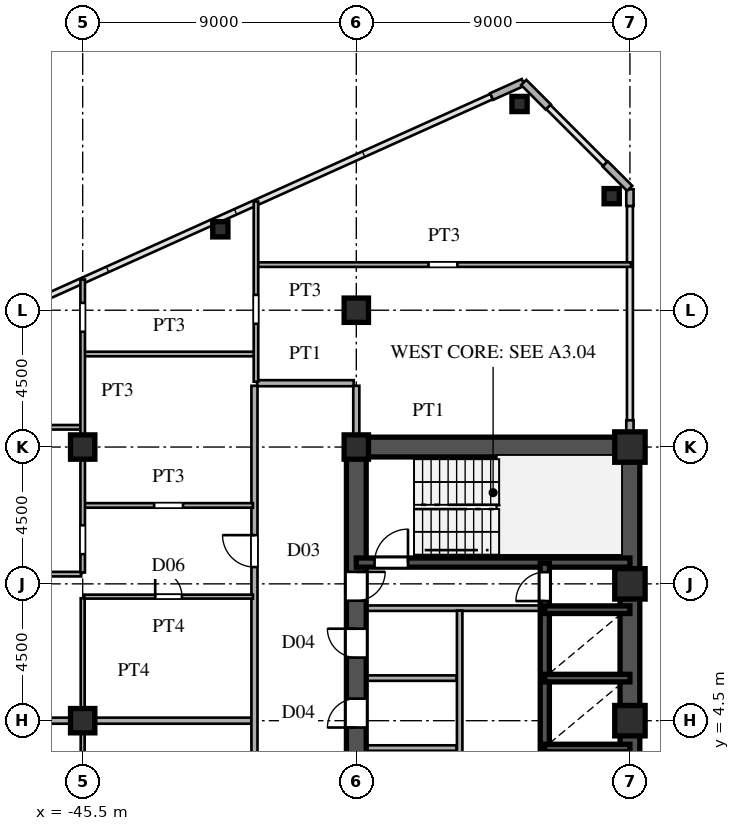
"""IFC4 building model, lengths in metres.
Left out: names, types, materials, properties, quantities, classifications, styles, units other than length and angle.
Written with IfcOpenShell. Run it as: python <this file> out.ifc"""

import sys

from ifc_helpers import new_model, si_unit, direction, frame, frame_2d, origin, origin_2d, place, context, subcontext, project, spatial, rectangle, hollow_rectangle, i_section, extrude, source, transform, mapped, element, fill, save


model = new_model("IFC4")
c1 = context("Model", 3, precision=1e-05, world=origin(), true_north=direction((0.0, 1.0)))
c2 = subcontext(c1, "Body", "Model", "MODEL_VIEW")
j1 = project(units=[si_unit("LENGTHUNIT", "METRE"), si_unit("PLANEANGLEUNIT", "RADIAN")], contexts=[c1])
p1 = place(None, origin())
s1 = spatial("IfcSite", under=j1, at=p1, CompositionType="ELEMENT")
p2 = place(p1, origin())
s2 = spatial("IfcBuilding", under=s1, at=p2, CompositionType="ELEMENT")
p3 = place(p2, frame((0.0, 0.0, 80.1)))
s3 = spatial("IfcBuildingStorey", under=s2, at=p3, CompositionType="ELEMENT", Elevation=80.1)
m1 = source(origin(), c2, "Body", "SweptSolid", [
    extrude(hollow_rectangle(XDim=1.0, YDim=1.0, WallThickness=0.042, at=origin_2d()), origin(), (0.0, 0.0, 1.0), 3.6),
])
for number, where, z_axis, x_axis in (
    (1, (-27.5, 4.5, 0.0), (0.0, 0.0, 1.0), (1.0, 0.0, 0.0)),
    (2, (-27.5, 9.0, 0.0), (0.0, 0.0, 1.0), (1.0, 0.0, 0.0)),
    (3, (-27.5, 13.5, 0.0), (0.0, 0.0, 1.0), (1.0, 0.0, 0.0)),
):
    element("IfcColumn", number, at=place(p3, frame(where, z_axis=z_axis, x_axis=x_axis)), inside=s3, PredefinedType="COLUMN", context=c2, shape_type="MappedRepresentation", body=[
        mapped(m1, transform((0.0, 0.0, 0.0), scale=1.0)),
    ])
m2 = source(origin(), c2, "Body", "SweptSolid", [
    extrude(i_section(OverallWidth=0.8, OverallDepth=0.8, WebThickness=0.032, FlangeThickness=0.05, at=origin_2d()), origin(), (0.0, 0.0, 1.0), 3.6),
])
for number, where, z_axis, x_axis in (
    (4, (-36.5, 13.5, 0.0), (0.0, 0.0, 1.0), (1.0, 0.0, 0.0)),
    (5, (-36.5, 18.0, 0.0), (0.0, 0.0, 1.0), (1.0, 0.0, 0.0)),
    (6, (-45.5, 4.5, 0.0), (0.0, 0.0, 1.0), (1.0, 0.0, 0.0)),
    (7, (-45.5, 13.5, 0.0), (0.0, 0.0, 1.0), (1.0, 0.0, 0.0)),
):
    element("IfcColumn", number, at=place(p3, frame(where, z_axis=z_axis, x_axis=x_axis)), inside=s3, PredefinedType="COLUMN", context=c2, shape_type="MappedRepresentation", body=[
        mapped(m2, transform((0.0, 0.0, 0.0), scale=1.0)),
    ])
m3 = source(origin(), c2, "Body", "SweptSolid", [
    extrude(hollow_rectangle(XDim=0.5, YDim=0.5, WallThickness=0.02, at=origin_2d()), origin(), (0.0, 0.0, 1.0), 3.6),
])
for number, where, z_axis, x_axis in (
    (8, (-28.1, 21.751, 0.0), (0.0, 0.0, 1.0), (1.0, 0.0, 0.0)),
    (9, (-31.131, 24.783, 0.0), (0.0, 0.0, 1.0), (1.0, 0.0, 0.0)),
    (10, (-40.973, 20.661, 0.0), (0.0, 0.0, 1.0), (1.0, 0.0, 0.0)),
):
    element("IfcColumn", number, at=place(p3, frame(where, z_axis=z_axis, x_axis=x_axis)), inside=s3, PredefinedType="COLUMN", context=c2, shape_type="MappedRepresentation", body=[
        mapped(m3, transform((0.0, 0.0, 0.0), scale=1.0)),
    ])
p4 = place(p3, frame((-27.5, 13.83, 0.0), z_axis=(0.0, 0.0, 1.0), x_axis=(0.0, 1.0, 0.0)))
e11 = element("IfcWall", 11, at=p4, inside=s3, PredefinedType="SOLIDWALL", context=c2, shape_type="SweptSolid", body=[
    extrude(rectangle(XDim=0.55, YDim=0.24, at=frame_2d((0.275, 0.0))), origin(), (0.0, 0.0, 1.0), 2.88),
])
p5 = place(p3, frame((-27.5, 21.43, 0.0), z_axis=(0.0, 0.0, 1.0), x_axis=(0.0, 1.0, 0.0)))
e12 = element("IfcWall", 12, at=p5, inside=s3, PredefinedType="SOLIDWALL", context=c2, shape_type="SweptSolid", body=[
    extrude(rectangle(XDim=0.55, YDim=0.24, at=frame_2d((0.275, 0.0))), origin(), (0.0, 0.0, 1.0), 3.38),
])
for number, where, z_axis, x_axis in (
    (13, (-27.507, 22.007, 0.0), (0.0, 0.0, 1.0), (-0.707, 0.707, 0.0)),
    (14, (-30.187, 24.687, 0.0), (0.0, 0.0, 1.0), (-0.707, 0.707, 0.0)),
):
    element("IfcWall", number, at=place(p3, frame(where, z_axis=z_axis, x_axis=x_axis)), inside=s3, PredefinedType="SOLIDWALL", context=c2, shape_type="SweptSolid", body=[
        extrude(rectangle(XDim=1.14, YDim=0.24, at=frame_2d((0.57, 0.0))), origin(), (0.0, 0.0, 1.0), 3.38),
    ])
p6 = place(p3, frame((-31.009, 25.496, 0.0), z_axis=(0.0, 0.0, 1.0), x_axis=(-0.911929519623, -0.410346866979, 0.0)))
e15 = element("IfcWall", 15, at=p6, inside=s3, PredefinedType="SOLIDWALL", context=c2, shape_type="SweptSolid", body=[
    extrude(rectangle(XDim=1.14, YDim=0.24, at=frame_2d((0.57, 0.0))), origin(), (0.0, 0.0, 1.0), 3.38),
])
p7 = place(p3, frame((-27.5, 1.3, 0.0), z_axis=(0.0, 0.0, 1.0), x_axis=(0.0, 1.0, 0.0)))
e16 = element("IfcWall", 16, at=p7, inside=s3, PredefinedType="SHEAR", context=c2, shape_type="SweptSolid", body=[
    extrude(rectangle(XDim=12.2, YDim=0.65, at=frame_2d((6.1, 0.0))), origin(), (0.0, 0.0, 1.0), 3.38),
])
p8 = place(p3, frame((-36.5, 13.5, 0.0), z_axis=(0.0, 0.0, 1.0), x_axis=(1.0, 0.0, 0.0)))
e17 = element("IfcWall", 17, at=p8, inside=s3, PredefinedType="SHEAR", context=c2, shape_type="SweptSolid", body=[
    extrude(rectangle(XDim=9.0, YDim=0.65, at=frame_2d((4.5, 0.0))), origin(), (0.0, 0.0, 1.0), 3.38),
])
p9 = place(p3, frame((-36.5, 8.2, 0.0), z_axis=(0.0, 0.0, 1.0), x_axis=(0.0, 1.0, 0.0)))
e18 = element("IfcWall", 18, at=p9, inside=s3, PredefinedType="SHEAR", context=c2, shape_type="SweptSolid", body=[
    extrude(rectangle(XDim=5.45, YDim=0.65, at=frame_2d((2.725, 0.0))), origin(), (0.0, 0.0, 1.0), 3.38),
])
p10 = place(p9, frame((0.245, 0.0, 0.0)))
e19 = element("IfcOpeningElement", 19, at=p10, cuts=e18, PredefinedType="OPENING", context=c2, shape_type="SweptSolid", body=[
    extrude(rectangle(XDim=0.95, YDim=2.15, at=frame_2d((0.475, 1.075))), frame((0.0, 0.335, 0.0), z_axis=(0.0, -1.0, 0.0), x_axis=(1.0, 0.0, 0.0)), (0.0, 0.0, 1.0), 0.67),
])
p11 = place(p3, frame((-36.5, 1.3, 0.0), z_axis=(0.0, 0.0, 1.0), x_axis=(0.0, 1.0, 0.0)))
e20 = element("IfcWall", 20, at=p11, inside=s3, PredefinedType="SHEAR", context=c2, shape_type="SweptSolid", body=[
    extrude(rectangle(XDim=2.3, YDim=0.65, at=frame_2d((1.15, 0.0))), origin(), (0.0, 0.0, 1.0), 3.38),
])
p12 = place(p11, frame((0.675, 0.0, 0.0)))
e21 = element("IfcOpeningElement", 21, at=p12, cuts=e20, PredefinedType="OPENING", context=c2, shape_type="SweptSolid", body=[
    extrude(rectangle(XDim=0.95, YDim=2.15, at=frame_2d((0.475, 1.075))), frame((0.0, 0.335, 0.0), z_axis=(0.0, -1.0, 0.0), x_axis=(1.0, 0.0, 0.0)), (0.0, 0.0, 1.0), 0.67),
])
p13 = place(p3, frame((-36.5, 3.6, 0.0), z_axis=(0.0, 0.0, 1.0), x_axis=(0.0, 1.0, 0.0)))
e22 = element("IfcWall", 22, at=p13, inside=s3, PredefinedType="SHEAR", context=c2, shape_type="SweptSolid", body=[
    extrude(rectangle(XDim=2.3, YDim=0.65, at=frame_2d((1.15, 0.0))), origin(), (0.0, 0.0, 1.0), 3.38),
])
p14 = place(p13, frame((0.675, 0.0, 0.0)))
e23 = element("IfcOpeningElement", 23, at=p14, cuts=e22, PredefinedType="OPENING", context=c2, shape_type="SweptSolid", body=[
    extrude(rectangle(XDim=0.95, YDim=2.15, at=frame_2d((0.475, 1.075))), frame((0.0, 0.335, 0.0), z_axis=(0.0, -1.0, 0.0), x_axis=(1.0, 0.0, 0.0)), (0.0, 0.0, 1.0), 0.67),
])
p15 = place(p3, frame((-36.5, 5.9, 0.0), z_axis=(0.0, 0.0, 1.0), x_axis=(0.0, 1.0, 0.0)))
e24 = element("IfcWall", 24, at=p15, inside=s3, PredefinedType="SHEAR", context=c2, shape_type="SweptSolid", body=[
    extrude(rectangle(XDim=2.3, YDim=0.65, at=frame_2d((1.15, 0.0))), origin(), (0.0, 0.0, 1.0), 3.38),
])
p16 = place(p15, frame((0.675, 0.0, 0.0)))
e25 = element("IfcOpeningElement", 25, at=p16, cuts=e24, PredefinedType="OPENING", context=c2, shape_type="SweptSolid", body=[
    extrude(rectangle(XDim=0.95, YDim=2.15, at=frame_2d((0.475, 1.075))), frame((0.0, 0.335, 0.0), z_axis=(0.0, -1.0, 0.0), x_axis=(1.0, 0.0, 0.0)), (0.0, 0.0, 1.0), 0.67),
])
p17 = place(p3, frame((-36.5, 9.7, 0.0), z_axis=(0.0, 0.0, 1.0), x_axis=(1.0, 0.0, 0.0)))
e26 = element("IfcWall", 26, at=p17, inside=s3, PredefinedType="SHEAR", context=c2, shape_type="SweptSolid", body=[
    extrude(rectangle(XDim=9.0, YDim=0.3, at=frame_2d((4.5, 0.0))), origin(), (0.0, 0.0, 1.0), 3.38),
])
p18 = place(p17, frame((0.6, 0.0, 0.0)))
e27 = element("IfcOpeningElement", 27, at=p18, cuts=e26, PredefinedType="OPENING", context=c2, shape_type="SweptSolid", body=[
    extrude(rectangle(XDim=1.1, YDim=2.2, at=frame_2d((0.55, 1.1))), frame((0.0, 0.16, 0.0), z_axis=(0.0, -1.0, 0.0), x_axis=(1.0, 0.0, 0.0)), (0.0, 0.0, 1.0), 0.32),
])
for number, where, z_axis, x_axis in (
    (28, (-30.3, 3.6, 0.0), (0.0, 0.0, 1.0), (1.0, 0.0, 0.0)),
    (29, (-30.3, 5.9, 0.0), (0.0, 0.0, 1.0), (1.0, 0.0, 0.0)),
    (30, (-30.3, 8.15, 0.0), (0.0, 0.0, 1.0), (1.0, 0.0, 0.0)),
):
    element("IfcWall", number, at=place(p3, frame(where, z_axis=z_axis, x_axis=x_axis)), inside=s3, PredefinedType="SHEAR", context=c2, shape_type="SweptSolid", body=[
        extrude(rectangle(XDim=2.8, YDim=0.25, at=frame_2d((1.4, 0.0))), origin(), (0.0, 0.0, 1.0), 3.38),
    ])
p19 = place(p3, frame((-30.3, 1.32, 0.0), z_axis=(0.0, 0.0, 1.0), x_axis=(0.0, 1.0, 0.0)))
e31 = element("IfcWall", 31, at=p19, inside=s3, PredefinedType="SHEAR", context=c2, shape_type="SweptSolid", body=[
    extrude(rectangle(XDim=2.28, YDim=0.3, at=frame_2d((1.14, 0.0))), origin(), (0.0, 0.0, 1.0), 3.38),
])
p20 = place(p3, frame((-30.3, 3.6, 0.0), z_axis=(0.0, 0.0, 1.0), x_axis=(0.0, 1.0, 0.0)))
e32 = element("IfcWall", 32, at=p20, inside=s3, PredefinedType="SHEAR", context=c2, shape_type="SweptSolid", body=[
    extrude(rectangle(XDim=2.3, YDim=0.3, at=frame_2d((1.15, 0.0))), origin(), (0.0, 0.0, 1.0), 3.38),
])
p21 = place(p3, frame((-30.3, 5.9, 0.0), z_axis=(0.0, 0.0, 1.0), x_axis=(0.0, 1.0, 0.0)))
e33 = element("IfcWall", 33, at=p21, inside=s3, PredefinedType="SHEAR", context=c2, shape_type="SweptSolid", body=[
    extrude(rectangle(XDim=2.25, YDim=0.3, at=frame_2d((1.125, 0.0))), origin(), (0.0, 0.0, 1.0), 3.38),
])
p22 = place(p3, frame((-30.3, 8.15, 0.0), z_axis=(0.0, 0.0, 1.0), x_axis=(0.0, 1.0, 0.0)))
e34 = element("IfcWall", 34, at=p22, inside=s3, PredefinedType="SHEAR", context=c2, shape_type="SweptSolid", body=[
    extrude(rectangle(XDim=1.53, YDim=0.3, at=frame_2d((0.765, 0.0))), origin(), (0.0, 0.0, 1.0), 3.38),
])
p23 = place(p22, frame((0.285, 0.0, 0.0)))
e35 = element("IfcOpeningElement", 35, at=p23, cuts=e34, PredefinedType="OPENING", context=c2, shape_type="SweptSolid", body=[
    extrude(rectangle(XDim=0.95, YDim=2.15, at=frame_2d((0.475, 1.075))), frame((0.0, 0.16, 0.0), z_axis=(0.0, -1.0, 0.0), x_axis=(1.0, 0.0, 0.0)), (0.0, 0.0, 1.0), 0.32),
])
p24 = place(p3, frame((-36.15, 8.2, 0.0), z_axis=(0.0, 0.0, 1.0), x_axis=(1.0, 0.0, 0.0)))
e36 = element("IfcWall", 36, at=p24, inside=s3, PredefinedType="PARTITIONING", context=c2, shape_type="SweptSolid", body=[
    extrude(rectangle(XDim=5.7, YDim=0.18, at=frame_2d((2.85, 0.0))), origin(), (0.0, 0.0, 1.0), 3.38),
])
p25 = place(p3, frame((-33.1, 1.38, 0.0), z_axis=(0.0, 0.0, 1.0), x_axis=(0.0, 1.0, 0.0)))
e37 = element("IfcWall", 37, at=p25, inside=s3, PredefinedType="PARTITIONING", context=c2, shape_type="SweptSolid", body=[
    extrude(rectangle(XDim=6.74, YDim=0.18, at=frame_2d((3.37, 0.0))), origin(), (0.0, 0.0, 1.0), 3.38),
])
for number, where, z_axis, x_axis in (
    (38, (-36.15, 3.6, 0.0), (0.0, 0.0, 1.0), (1.0, 0.0, 0.0)),
    (39, (-36.15, 5.9, 0.0), (0.0, 0.0, 1.0), (1.0, 0.0, 0.0)),
):
    element("IfcWall", number, at=place(p3, frame(where, z_axis=z_axis, x_axis=x_axis)), inside=s3, PredefinedType="PARTITIONING", context=c2, shape_type="SweptSolid", body=[
        extrude(rectangle(XDim=2.95, YDim=0.18, at=frame_2d((1.475, 0.0))), origin(), (0.0, 0.0, 1.0), 3.38),
    ])
p26 = place(p3, frame((-54.52, 4.5, 0.0), z_axis=(0.0, 0.0, 1.0), x_axis=(1.0, 0.0, 0.0)))
e40 = element("IfcWall", 40, at=p26, inside=s3, PredefinedType="PARTITIONING", context=c2, shape_type="SweptSolid", body=[
    extrude(rectangle(XDim=14.59, YDim=0.2, at=frame_2d((7.295, 0.0))), origin(), (0.0, 0.0, 1.0), 2.68),
])
p27 = place(p3, frame((-45.45, 8.58, 0.0), z_axis=(0.0, 0.0, 1.0), x_axis=(1.0, 0.0, 0.0)))
e41 = element("IfcWall", 41, at=p27, inside=s3, PredefinedType="PARTITIONING", context=c2, shape_type="SweptSolid", body=[
    extrude(rectangle(XDim=5.55, YDim=0.13, at=frame_2d((2.775, 0.0))), origin(), (0.0, 0.0, 1.0), 3.38),
])
p28 = place(p27, frame((2.335, 0.0, 0.0)))
e42 = element("IfcOpeningElement", 42, at=p28, cuts=e41, PredefinedType="OPENING", context=c2, shape_type="SweptSolid", body=[
    extrude(rectangle(XDim=0.88, YDim=2.1, at=frame_2d((0.44, 1.05))), frame((0.0, 0.075, 0.0), z_axis=(0.0, -1.0, 0.0), x_axis=(1.0, 0.0, 0.0)), (0.0, 0.0, 1.0), 0.15),
])
p29 = place(p3, frame((-66.979, 9.32, 0.0), z_axis=(0.0, 0.0, 1.0), x_axis=(1.0, 0.0, 0.0)))
e43 = element("IfcWall", 43, at=p29, inside=s3, PredefinedType="PARTITIONING", context=c2, shape_type="SweptSolid", body=[
    extrude(rectangle(XDim=21.429, YDim=0.15, at=frame_2d((10.714, 0.0))), origin(), (0.0, 0.0, 1.0), 3.38),
])
p30 = place(p29, frame((16.504, 0.0, 0.0)))
e44 = element("IfcOpeningElement", 44, at=p30, cuts=e43, PredefinedType="OPENING", context=c2, shape_type="SweptSolid", body=[
    extrude(rectangle(XDim=0.95, YDim=2.15, at=frame_2d((0.475, 1.075))), frame((0.0, 0.085, 0.0), z_axis=(0.0, -1.0, 0.0), x_axis=(1.0, 0.0, 0.0)), (0.0, 0.0, 1.0), 0.17),
])
p31 = place(p3, frame((-45.45, 11.58, 0.0), z_axis=(0.0, 0.0, 1.0), x_axis=(1.0, 0.0, 0.0)))
e45 = element("IfcWall", 45, at=p31, inside=s3, PredefinedType="PARTITIONING", context=c2, shape_type="SweptSolid", body=[
    extrude(rectangle(XDim=5.55, YDim=0.15, at=frame_2d((2.775, 0.0))), origin(), (0.0, 0.0, 1.0), 3.38),
])
p32 = place(p31, frame((2.3, 0.0, 0.0)))
e46 = element("IfcOpeningElement", 46, at=p32, cuts=e45, PredefinedType="OPENING", context=c2, shape_type="SweptSolid", body=[
    extrude(rectangle(XDim=0.95, YDim=2.15, at=frame_2d((0.475, 1.075))), frame((0.0, 0.085, 0.0), z_axis=(0.0, -1.0, 0.0), x_axis=(1.0, 0.0, 0.0)), (0.0, 0.0, 1.0), 0.17),
])
p33 = place(p3, frame((-54.45, 14.15, 0.0), z_axis=(0.0, 0.0, 1.0), x_axis=(1.0, 0.0, 0.0)))
e47 = element("IfcWall", 47, at=p33, inside=s3, PredefinedType="PARTITIONING", context=c2, shape_type="SweptSolid", body=[
    extrude(rectangle(XDim=8.9, YDim=0.15, at=frame_2d((4.45, 0.0))), origin(), (0.0, 0.0, 1.0), 3.38),
])
p34 = place(p33, frame((3.975, 0.0, 0.0)))
e48 = element("IfcOpeningElement", 48, at=p34, cuts=e47, PredefinedType="OPENING", context=c2, shape_type="SweptSolid", body=[
    extrude(rectangle(XDim=0.95, YDim=2.15, at=frame_2d((0.475, 1.075))), frame((0.0, 0.085, 0.0), z_axis=(0.0, -1.0, 0.0), x_axis=(1.0, 0.0, 0.0)), (0.0, 0.0, 1.0), 0.17),
])
p35 = place(p3, frame((-39.765, 15.6, 0.0), z_axis=(0.0, 0.0, 1.0), x_axis=(1.0, 0.0, 0.0)))
e49 = element("IfcWall", 49, at=p35, inside=s3, PredefinedType="PARTITIONING", context=c2, shape_type="SweptSolid", body=[
    extrude(rectangle(XDim=3.18, YDim=0.2, at=frame_2d((1.59, 0.0))), origin(), (0.0, 0.0, 1.0), 3.38),
])
p36 = place(p3, frame((-45.45, 16.56, 0.0), z_axis=(0.0, 0.0, 1.0), x_axis=(1.0, 0.0, 0.0)))
e50 = element("IfcWall", 50, at=p36, inside=s3, PredefinedType="PARTITIONING", context=c2, shape_type="SweptSolid", body=[
    extrude(rectangle(XDim=5.6, YDim=0.15, at=frame_2d((2.8, 0.0))), origin(), (0.0, 0.0, 1.0), 3.38),
])
p37 = place(p3, frame((-39.75, 19.5, 0.0), z_axis=(0.0, 0.0, 1.0), x_axis=(1.0, 0.0, 0.0)))
e51 = element("IfcWall", 51, at=p37, inside=s3, PredefinedType="PARTITIONING", context=c2, shape_type="SweptSolid", body=[
    extrude(rectangle(XDim=12.285, YDim=0.15, at=frame_2d((6.143, 0.0))), origin(), (0.0, 0.0, 1.0), 3.38),
])
p38 = place(p37, frame((5.625, 0.0, 0.0)))
e52 = element("IfcOpeningElement", 52, at=p38, cuts=e51, PredefinedType="OPENING", context=c2, shape_type="SweptSolid", body=[
    extrude(rectangle(XDim=0.95, YDim=2.15, at=frame_2d((0.475, 1.075))), frame((0.0, 0.085, 0.0), z_axis=(0.0, -1.0, 0.0), x_axis=(1.0, 0.0, 0.0)), (0.0, 0.0, 1.0), 0.17),
])
p39 = place(p3, frame((-45.5, 0.352, 0.0), z_axis=(0.0, 0.0, 1.0), x_axis=(0.0, 1.0, 0.0)))
e53 = element("IfcWall", 53, at=p39, inside=s3, PredefinedType="PARTITIONING", context=c2, shape_type="SweptSolid", body=[
    extrude(rectangle(XDim=8.176, YDim=0.13, at=frame_2d((4.088, 0.0))), origin(), (0.0, 0.0, 1.0), 2.68),
])
p40 = place(p3, frame((-45.5, 9.375, 0.0), z_axis=(0.0, 0.0, 1.0), x_axis=(0.0, 1.0, 0.0)))
e54 = element("IfcWall", 54, at=p40, inside=s3, PredefinedType="PARTITIONING", context=c2, shape_type="SweptSolid", body=[
    extrude(rectangle(XDim=9.635, YDim=0.15, at=frame_2d((4.817, 0.0))), origin(), (0.0, 0.0, 1.0), 2.68),
])
p41 = place(p40, frame((0.601, 0.0, 0.0)))
e55 = element("IfcOpeningElement", 55, at=p41, cuts=e54, PredefinedType="OPENING", context=c2, shape_type="SweptSolid", body=[
    extrude(rectangle(XDim=0.95, YDim=2.15, at=frame_2d((0.475, 1.075))), frame((0.0, 0.085, 0.0), z_axis=(0.0, -1.0, 0.0), x_axis=(1.0, 0.0, 0.0)), (0.0, 0.0, 1.0), 0.17),
])
p42 = place(p40, frame((7.917, 0.0, 0.0)))
e56 = element("IfcOpeningElement", 56, at=p42, cuts=e54, PredefinedType="OPENING", context=c2, shape_type="SweptSolid", body=[
    extrude(rectangle(XDim=0.95, YDim=2.15, at=frame_2d((0.475, 1.075))), frame((0.0, 0.085, 0.0), z_axis=(0.0, -1.0, 0.0), x_axis=(1.0, 0.0, 0.0)), (0.0, 0.0, 1.0), 0.17),
])
p43 = place(p3, frame((-39.85, -15.515, 0.0), z_axis=(0.0, 0.0, 1.0), x_axis=(0.0, 1.0, 0.0)))
e57 = element("IfcWall", 57, at=p43, inside=s3, PredefinedType="PARTITIONING", context=c2, shape_type="SweptSolid", body=[
    extrude(rectangle(XDim=31.03, YDim=0.2, at=frame_2d((15.515, 0.0))), origin(), (0.0, 0.0, 1.0), 3.38),
])
p44 = place(p43, frame((2.44, 0.0, 0.0)))
e58 = element("IfcOpeningElement", 58, at=p44, cuts=e57, PredefinedType="OPENING", context=c2, shape_type="SweptSolid", body=[
    extrude(rectangle(XDim=1.05, YDim=2.25, at=frame_2d((0.525, 1.125))), frame((0.0, 0.11, 0.0), z_axis=(0.0, -1.0, 0.0), x_axis=(1.0, 0.0, 0.0)), (0.0, 0.0, 1.0), 0.22),
])
p45 = place(p43, frame((12.28, 0.0, 0.0)))
e59 = element("IfcOpeningElement", 59, at=p45, cuts=e57, PredefinedType="OPENING", context=c2, shape_type="SweptSolid", body=[
    extrude(rectangle(XDim=1.05, YDim=2.25, at=frame_2d((0.525, 1.125))), frame((0.0, 0.11, 0.0), z_axis=(0.0, -1.0, 0.0), x_axis=(1.0, 0.0, 0.0)), (0.0, 0.0, 1.0), 0.22),
])
p46 = place(p43, frame((25.067, 0.0, 0.0)))
e60 = element("IfcOpeningElement", 60, at=p46, cuts=e57, PredefinedType="OPENING", context=c2, shape_type="SweptSolid", body=[
    extrude(rectangle(XDim=1.05, YDim=2.25, at=frame_2d((0.525, 1.125))), frame((0.0, 0.11, 0.0), z_axis=(0.0, -1.0, 0.0), x_axis=(1.0, 0.0, 0.0)), (0.0, 0.0, 1.0), 0.22),
])
p47 = place(p3, frame((-39.8, 15.65, 0.0), z_axis=(0.0, 0.0, 1.0), x_axis=(0.0, 1.0, 0.0)))
e61 = element("IfcWall", 61, at=p47, inside=s3, PredefinedType="PARTITIONING", context=c2, shape_type="SweptSolid", body=[
    extrude(rectangle(XDim=5.925, YDim=0.15, at=frame_2d((2.962, 0.0))), origin(), (0.0, 0.0, 1.0), 3.38),
])
p48 = place(p47, frame((1.904, 0.0, 0.0)))
e62 = element("IfcOpeningElement", 62, at=p48, cuts=e61, PredefinedType="OPENING", context=c2, shape_type="SweptSolid", body=[
    extrude(rectangle(XDim=0.95, YDim=2.15, at=frame_2d((0.475, 1.075))), frame((0.0, 0.085, 0.0), z_axis=(0.0, -1.0, 0.0), x_axis=(1.0, 0.0, 0.0)), (0.0, 0.0, 1.0), 0.17),
])
p49 = place(p3, frame((-36.5, 13.83, 0.0), z_axis=(0.0, 0.0, 1.0), x_axis=(0.0, 1.0, 0.0)))
e63 = element("IfcWall", 63, at=p49, inside=s3, PredefinedType="PARTITIONING", context=c2, shape_type="SweptSolid", body=[
    extrude(rectangle(XDim=1.685, YDim=0.2, at=frame_2d((0.842, 0.0))), origin(), (0.0, 0.0, 1.0), 2.68),
])
m4 = source(origin(), c2, "Body", "SweptSolid", [
    extrude(rectangle(XDim=0.95, YDim=2.15, at=frame_2d((0.475, 1.075))), frame((0.0, 0.025, 0.0), z_axis=(0.0, -1.0, 0.0), x_axis=(1.0, 0.0, 0.0)), (0.0, 0.0, 1.0), 0.05),
])
p50 = place(p10, frame((0.95, 0.0, 0.0), z_axis=(0.0, 0.0, 1.0), x_axis=(-1.0, 0.0, 0.0)))
e64 = element("IfcDoor", 64, at=p50, inside=s3, OperationType="SINGLE_SWING_RIGHT", PredefinedType="DOOR", context=c2, shape_type="MappedRepresentation", body=[
    mapped(m4, transform((0.0, 0.0, 0.0), scale=1.0)),
])
fill(e19, e64)
p51 = place(p14, origin())
e65 = element("IfcDoor", 65, at=p51, inside=s3, OperationType="SINGLE_SWING_LEFT", PredefinedType="DOOR", context=c2, shape_type="MappedRepresentation", body=[
    mapped(m4, transform((0.0, 0.0, 0.0), scale=1.0)),
])
fill(e23, e65)
p52 = place(p16, origin())
e66 = element("IfcDoor", 66, at=p52, inside=s3, OperationType="SINGLE_SWING_RIGHT", PredefinedType="DOOR", context=c2, shape_type="MappedRepresentation", body=[
    mapped(m4, transform((0.0, 0.0, 0.0), scale=1.0)),
])
fill(e25, e66)
m5 = source(origin(), c2, "Body", "SweptSolid", [
    extrude(rectangle(XDim=1.1, YDim=2.2, at=frame_2d((0.55, 1.1))), frame((0.0, 0.025, 0.0), z_axis=(0.0, -1.0, 0.0), x_axis=(1.0, 0.0, 0.0)), (0.0, 0.0, 1.0), 0.05),
])
p53 = place(p18, origin())
e67 = element("IfcDoor", 67, at=p53, inside=s3, OperationType="SINGLE_SWING_RIGHT", PredefinedType="DOOR", context=c2, shape_type="MappedRepresentation", body=[
    mapped(m5, transform((0.0, 0.0, 0.0), scale=1.0)),
])
fill(e27, e67)
p54 = place(p23, origin())
e68 = element("IfcDoor", 68, at=p54, inside=s3, OperationType="SINGLE_SWING_LEFT", PredefinedType="DOOR", context=c2, shape_type="MappedRepresentation", body=[
    mapped(m4, transform((0.0, 0.0, 0.0), scale=1.0)),
])
fill(e35, e68)
m6 = source(origin(), c2, "Body", "SweptSolid", [
    extrude(rectangle(XDim=0.88, YDim=2.1, at=frame_2d((0.44, 1.05))), frame((0.0, 0.025, 0.0), z_axis=(0.0, -1.0, 0.0), x_axis=(1.0, 0.0, 0.0)), (0.0, 0.0, 1.0), 0.05),
])
p55 = place(p28, origin())
e69 = element("IfcDoor", 69, at=p55, inside=s3, OperationType="SINGLE_SWING_LEFT", PredefinedType="DOOR", context=c2, shape_type="MappedRepresentation", body=[
    mapped(m6, transform((0.0, 0.0, 0.0), scale=1.0)),
])
fill(e42, e69)
m7 = source(origin(), c2, "Body", "SweptSolid", [
    extrude(rectangle(XDim=1.05, YDim=2.25, at=frame_2d((0.525, 1.125))), frame((0.0, 0.025, 0.0), z_axis=(0.0, -1.0, 0.0), x_axis=(1.0, 0.0, 0.0)), (0.0, 0.0, 1.0), 0.05),
])
p56 = place(p46, origin())
e70 = element("IfcDoor", 70, at=p56, inside=s3, OperationType="SINGLE_SWING_RIGHT", PredefinedType="DOOR", context=c2, shape_type="MappedRepresentation", body=[
    mapped(m7, transform((0.0, 0.0, 0.0), scale=1.0)),
])
fill(e60, e70)
save(model, sys.argv[1])
